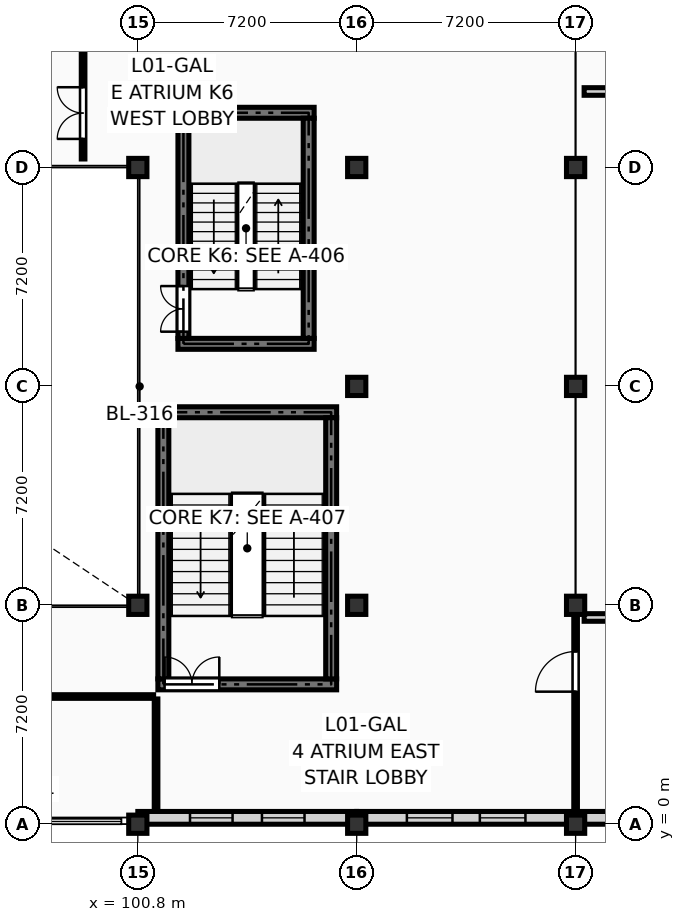
"""IFC4 building model, lengths in metres.
Left out: names, types, materials, properties, quantities, classifications, styles, units other than length and angle.
Written with IfcOpenShell. Run it as: python <this file> out.ifc"""

import sys

from ifc_helpers import new_model, si_unit, direction, frame, frame_2d, origin, origin_2d, place, context, subcontext, project, spatial, rectangle, extrude, element, fill, save


model = new_model("IFC4")
c1 = context("Model", 3, precision=1e-05, world=origin(), true_north=direction((0.0, 1.0)))
c2 = subcontext(c1, "Body", "Model", "MODEL_VIEW")
j1 = project(units=[si_unit("LENGTHUNIT", "METRE"), si_unit("PLANEANGLEUNIT", "RADIAN")], contexts=[c1])
p1 = place(None, origin())
s1 = spatial("IfcSite", under=j1, at=p1, CompositionType="ELEMENT")
p2 = place(p1, origin())
s2 = spatial("IfcBuilding", under=s1, at=p2, CompositionType="ELEMENT")
p3 = place(p2, frame((0.0, 0.0, 4.5)))
s3 = spatial("IfcBuildingStorey", under=s2, at=p3, CompositionType="ELEMENT", Elevation=4.5)
for number, where, z_axis, x_axis in (
    (1, (100.8, 0.0, 0.0), (0.0, 0.0, 1.0), (1.0, 0.0, 0.0)),
    (2, (100.8, 7.2, 0.0), (0.0, 0.0, 1.0), (1.0, 0.0, 0.0)),
    (3, (100.8, 21.6, 0.0), (0.0, 0.0, 1.0), (1.0, 0.0, 0.0)),
    (4, (108.0, 0.0, 0.0), (0.0, 0.0, 1.0), (1.0, 0.0, 0.0)),
    (5, (108.0, 7.2, 0.0), (0.0, 0.0, 1.0), (1.0, 0.0, 0.0)),
    (6, (108.0, 14.4, 0.0), (0.0, 0.0, 1.0), (1.0, 0.0, 0.0)),
    (7, (108.0, 21.6, 0.0), (0.0, 0.0, 1.0), (1.0, 0.0, 0.0)),
    (8, (115.2, 0.0, 0.0), (0.0, 0.0, 1.0), (1.0, 0.0, 0.0)),
    (9, (115.2, 7.2, 0.0), (0.0, 0.0, 1.0), (1.0, 0.0, 0.0)),
    (10, (115.2, 14.4, 0.0), (0.0, 0.0, 1.0), (1.0, 0.0, 0.0)),
    (11, (115.2, 21.6, 0.0), (0.0, 0.0, 1.0), (1.0, 0.0, 0.0)),
):
    element("IfcColumn", number, at=place(p3, frame(where, z_axis=z_axis, x_axis=x_axis)), inside=s3, PredefinedType="COLUMN", context=c2, shape_type="SweptSolid", body=[
        extrude(rectangle(XDim=0.6, YDim=0.6, at=origin_2d()), origin(), (0.0, 0.0, 1.0), 4.05),
    ])
p4 = place(p3, frame((115.2, 0.21, 0.0), z_axis=(0.0, 0.0, 1.0), x_axis=(1.0, 0.0, 0.0)))
e12 = element("IfcWall", 12, at=p4, inside=s3, PredefinedType="SOLIDWALL", context=c2, shape_type="SweptSolid", body=[
    extrude(rectangle(XDim=7.2, YDim=0.42, at=frame_2d((3.6, 0.0))), origin(), (0.0, 0.0, 1.0), 3.16),
])
p5 = place(p4, frame((1.75, 0.0, 0.45)))
e13 = element("IfcOpeningElement", 13, at=p5, cuts=e12, PredefinedType="OPENING", context=c2, shape_type="SweptSolid", body=[
    extrude(rectangle(XDim=1.35, YDim=2.45, at=frame_2d((0.675, 1.225))), frame((0.0, 0.222, 0.0), z_axis=(0.0, -1.0, 0.0), x_axis=(1.0, 0.0, 0.0)), (0.0, 0.0, 1.0), 0.444),
])
p6 = place(p4, frame((4.1, 0.0, 0.45)))
e14 = element("IfcOpeningElement", 14, at=p6, cuts=e12, PredefinedType="OPENING", context=c2, shape_type="SweptSolid", body=[
    extrude(rectangle(XDim=1.35, YDim=2.45, at=frame_2d((0.675, 1.225))), frame((0.0, 0.222, 0.0), z_axis=(0.0, -1.0, 0.0), x_axis=(1.0, 0.0, 0.0)), (0.0, 0.0, 1.0), 0.444),
])
p7 = place(p3, frame((108.0, 0.21, 0.0), z_axis=(0.0, 0.0, 1.0), x_axis=(1.0, 0.0, 0.0)))
e15 = element("IfcWall", 15, at=p7, inside=s3, PredefinedType="SOLIDWALL", context=c2, shape_type="SweptSolid", body=[
    extrude(rectangle(XDim=7.2, YDim=0.42, at=frame_2d((3.6, 0.0))), origin(), (0.0, 0.0, 1.0), 3.16),
])
p8 = place(p7, frame((1.65, 0.0, 0.45)))
e16 = element("IfcOpeningElement", 16, at=p8, cuts=e15, PredefinedType="OPENING", context=c2, shape_type="SweptSolid", body=[
    extrude(rectangle(XDim=1.5, YDim=2.4, at=frame_2d((0.75, 1.2))), frame((0.0, 0.222, 0.0), z_axis=(0.0, -1.0, 0.0), x_axis=(1.0, 0.0, 0.0)), (0.0, 0.0, 1.0), 0.444),
])
p9 = place(p7, frame((4.05, 0.0, 0.45)))
e17 = element("IfcOpeningElement", 17, at=p9, cuts=e15, PredefinedType="OPENING", context=c2, shape_type="SweptSolid", body=[
    extrude(rectangle(XDim=1.5, YDim=2.4, at=frame_2d((0.75, 1.2))), frame((0.0, 0.222, 0.0), z_axis=(0.0, -1.0, 0.0), x_axis=(1.0, 0.0, 0.0)), (0.0, 0.0, 1.0), 0.444),
])
p10 = place(p3, frame((100.8, 0.21, 0.0), z_axis=(0.0, 0.0, 1.0), x_axis=(1.0, 0.0, 0.0)))
e18 = element("IfcWall", 18, at=p10, inside=s3, PredefinedType="SOLIDWALL", context=c2, shape_type="SweptSolid", body=[
    extrude(rectangle(XDim=7.2, YDim=0.42, at=frame_2d((3.6, 0.0))), origin(), (0.0, 0.0, 1.0), 3.16),
])
p11 = place(p10, frame((1.717, 0.0, 0.45)))
e19 = element("IfcOpeningElement", 19, at=p11, cuts=e18, PredefinedType="OPENING", context=c2, shape_type="SweptSolid", body=[
    extrude(rectangle(XDim=1.4, YDim=2.38, at=frame_2d((0.7, 1.19))), frame((0.0, 0.222, 0.0), z_axis=(0.0, -1.0, 0.0), x_axis=(1.0, 0.0, 0.0)), (0.0, 0.0, 1.0), 0.444),
])
p12 = place(p10, frame((4.083, 0.0, 0.45)))
e20 = element("IfcOpeningElement", 20, at=p12, cuts=e18, PredefinedType="OPENING", context=c2, shape_type="SweptSolid", body=[
    extrude(rectangle(XDim=1.4, YDim=2.38, at=frame_2d((0.7, 1.19))), frame((0.0, 0.222, 0.0), z_axis=(0.0, -1.0, 0.0), x_axis=(1.0, 0.0, 0.0)), (0.0, 0.0, 1.0), 0.444),
])
for number, where, z_axis, x_axis in (
    (21, (102.12, 15.8, 0.0), (0.0, 0.0, 1.0), (1.0, 0.0, 0.0)),
    (22, (102.12, 23.4, 0.0), (0.0, 0.0, 1.0), (1.0, 0.0, 0.0)),
):
    element("IfcWall", number, at=place(p3, frame(where, z_axis=z_axis, x_axis=x_axis)), inside=s3, PredefinedType="SHEAR", context=c2, shape_type="SweptSolid", body=[
        extrude(rectangle(XDim=4.48, YDim=0.36, at=frame_2d((2.24, 0.0))), origin(), (0.0, 0.0, 1.0), 3.79),
    ])
p13 = place(p3, frame((102.3, 15.98, 0.0), z_axis=(0.0, 0.0, 1.0), x_axis=(0.0, 1.0, 0.0)))
e23 = element("IfcWall", 23, at=p13, inside=s3, PredefinedType="SHEAR", context=c2, shape_type="SweptSolid", body=[
    extrude(rectangle(XDim=7.24, YDim=0.36, at=frame_2d((3.62, 0.0))), origin(), (0.0, 0.0, 1.0), 3.79),
])
p14 = place(p13, frame((0.22, 0.0, 0.0)))
e24 = element("IfcOpeningElement", 24, at=p14, cuts=e23, PredefinedType="OPENING", context=c2, shape_type="SweptSolid", body=[
    extrude(rectangle(XDim=1.5, YDim=2.2, at=frame_2d((0.75, 1.1))), frame((0.0, 0.192, 0.0), z_axis=(0.0, -1.0, 0.0), x_axis=(1.0, 0.0, 0.0)), (0.0, 0.0, 1.0), 0.384),
])
p15 = place(p3, frame((106.42, 15.98, 0.0), z_axis=(0.0, 0.0, 1.0), x_axis=(0.0, 1.0, 0.0)))
e25 = element("IfcWall", 25, at=p15, inside=s3, PredefinedType="SHEAR", context=c2, shape_type="SweptSolid", body=[
    extrude(rectangle(XDim=7.24, YDim=0.36, at=frame_2d((3.62, 0.0))), origin(), (0.0, 0.0, 1.0), 3.79),
])
p16 = place(p3, frame((101.46, 4.6, 0.0), z_axis=(0.0, 0.0, 1.0), x_axis=(1.0, 0.0, 0.0)))
e26 = element("IfcWall", 26, at=p16, inside=s3, PredefinedType="SHEAR", context=c2, shape_type="SweptSolid", body=[
    extrude(rectangle(XDim=5.88, YDim=0.36, at=frame_2d((2.94, 0.0))), origin(), (0.0, 0.0, 1.0), 3.79),
])
p17 = place(p16, frame((0.22, 0.0, 0.0)))
e27 = element("IfcOpeningElement", 27, at=p17, cuts=e26, PredefinedType="OPENING", context=c2, shape_type="SweptSolid", body=[
    extrude(rectangle(XDim=1.8, YDim=2.2, at=frame_2d((0.9, 1.1))), frame((0.0, 0.192, 0.0), z_axis=(0.0, -1.0, 0.0), x_axis=(1.0, 0.0, 0.0)), (0.0, 0.0, 1.0), 0.384),
])
p18 = place(p3, frame((101.46, 13.55, 0.0), z_axis=(0.0, 0.0, 1.0), x_axis=(1.0, 0.0, 0.0)))
e28 = element("IfcWall", 28, at=p18, inside=s3, PredefinedType="SHEAR", context=c2, shape_type="SweptSolid", body=[
    extrude(rectangle(XDim=5.88, YDim=0.36, at=frame_2d((2.94, 0.0))), origin(), (0.0, 0.0, 1.0), 3.79),
])
for number, where, z_axis, x_axis in (
    (29, (101.64, 4.78, 0.0), (0.0, 0.0, 1.0), (0.0, 1.0, 0.0)),
    (30, (107.16, 4.78, 0.0), (0.0, 0.0, 1.0), (0.0, 1.0, 0.0)),
):
    element("IfcWall", number, at=place(p3, frame(where, z_axis=z_axis, x_axis=x_axis)), inside=s3, PredefinedType="SHEAR", context=c2, shape_type="SweptSolid", body=[
        extrude(rectangle(XDim=8.59, YDim=0.36, at=frame_2d((4.295, 0.0))), origin(), (0.0, 0.0, 1.0), 3.79),
    ])
p19 = place(p2, origin())
s4 = spatial("IfcBuildingStorey", under=s2, at=p19, CompositionType="ELEMENT", Elevation=0.0)
p20 = place(p19, frame((115.48, 6.8, 0.0), z_axis=(0.0, 0.0, 1.0), x_axis=(1.0, 0.0, 0.0)))
e31 = element("IfcWall", 31, at=p20, inside=s4, PredefinedType="PARTITIONING", context=c2, shape_type="SweptSolid", body=[
    extrude(rectangle(XDim=19.24, YDim=0.25, at=frame_2d((9.62, 0.0))), origin(), (0.0, 0.0, 1.0), 7.525),
])
p21 = place(p19, frame((115.48, 24.1, 0.0), z_axis=(0.0, 0.0, 1.0), x_axis=(1.0, 0.0, 0.0)))
e32 = element("IfcWall", 32, at=p21, inside=s4, PredefinedType="PARTITIONING", context=c2, shape_type="SweptSolid", body=[
    extrude(rectangle(XDim=19.24, YDim=0.25, at=frame_2d((9.62, 0.0))), origin(), (0.0, 0.0, 1.0), 8.185),
])
p22 = place(p21, frame((8.72, 0.0, 0.0)))
e33 = element("IfcOpeningElement", 33, at=p22, cuts=e32, PredefinedType="OPENING", context=c2, shape_type="SweptSolid", body=[
    extrude(rectangle(XDim=1.8, YDim=2.3, at=frame_2d((0.9, 1.15))), frame((0.0, 0.137, 0.0), z_axis=(0.0, -1.0, 0.0), x_axis=(1.0, 0.0, 0.0)), (0.0, 0.0, 1.0), 0.274),
])
p23 = place(p3, frame((101.4, 0.48, 0.0), z_axis=(0.0, 0.0, 1.0), x_axis=(0.0, 1.0, 0.0)))
e34 = element("IfcWall", 34, at=p23, inside=s3, PredefinedType="PARTITIONING", context=c2, shape_type="SweptSolid", body=[
    extrude(rectangle(XDim=3.64, YDim=0.12, at=frame_2d((1.82, 0.0))), origin(), (0.0, 0.0, 1.0), 3.775),
])
p24 = place(p3, frame((64.88, 4.2, 0.0), z_axis=(0.0, 0.0, 1.0), x_axis=(1.0, 0.0, 0.0)))
e35 = element("IfcWall", 35, at=p24, inside=s3, PredefinedType="PARTITIONING", context=c2, shape_type="SweptSolid", body=[
    extrude(rectangle(XDim=36.44, YDim=0.12, at=frame_2d((18.22, 0.0))), origin(), (0.0, 0.0, 1.0), 3.775),
])
p25 = place(p24, frame((17.56, 0.0, 0.0)))
e36 = element("IfcOpeningElement", 36, at=p25, cuts=e35, PredefinedType="OPENING", context=c2, shape_type="SweptSolid", body=[
    extrude(rectangle(XDim=1.32, YDim=2.2, at=frame_2d((0.66, 1.1))), frame((0.0, 0.072, 0.0), z_axis=(0.0, -1.0, 0.0), x_axis=(1.0, 0.0, 0.0)), (0.0, 0.0, 1.0), 0.144),
])
p26 = place(p3, frame((99.0, 21.88, 0.0), z_axis=(0.0, 0.0, 1.0), x_axis=(0.0, 1.0, 0.0)))
e37 = element("IfcWall", 37, at=p26, inside=s3, PredefinedType="PARTITIONING", context=c2, shape_type="SweptSolid", body=[
    extrude(rectangle(XDim=6.44, YDim=0.12, at=frame_2d((3.22, 0.0))), origin(), (0.0, 0.0, 1.0), 3.775),
])
p27 = place(p26, frame((0.66, 0.0, 0.0)))
e38 = element("IfcOpeningElement", 38, at=p27, cuts=e37, PredefinedType="OPENING", context=c2, shape_type="SweptSolid", body=[
    extrude(rectangle(XDim=1.7, YDim=2.28, at=frame_2d((0.85, 1.14))), frame((0.0, 0.072, 0.0), z_axis=(0.0, -1.0, 0.0), x_axis=(1.0, 0.0, 0.0)), (0.0, 0.0, 1.0), 0.144),
])
p28 = place(p3, frame((115.2, 0.48, 0.0), z_axis=(0.0, 0.0, 1.0), x_axis=(0.0, 1.0, 0.0)))
e39 = element("IfcWall", 39, at=p28, inside=s3, PredefinedType="PARTITIONING", context=c2, shape_type="SweptSolid", body=[
    extrude(rectangle(XDim=6.44, YDim=0.12, at=frame_2d((3.22, 0.0))), origin(), (0.0, 0.0, 1.0), 2.925),
])
p29 = place(p28, frame((3.88, 0.0, 0.0)))
e40 = element("IfcOpeningElement", 40, at=p29, cuts=e39, PredefinedType="OPENING", context=c2, shape_type="SweptSolid", body=[
    extrude(rectangle(XDim=1.32, YDim=2.2, at=frame_2d((0.66, 1.1))), frame((0.0, 0.072, 0.0), z_axis=(0.0, -1.0, 0.0), x_axis=(1.0, 0.0, 0.0)), (0.0, 0.0, 1.0), 0.144),
])
p30 = place(p8, origin())
e41 = element("IfcWindow", 41, at=p30, inside=s3, PartitioningType="SINGLE_PANEL", PredefinedType="WINDOW", context=c2, shape_type="SweptSolid", body=[
    extrude(rectangle(XDim=1.5, YDim=2.4, at=frame_2d((0.75, 1.2))), frame((0.0, 0.03, 0.0), z_axis=(0.0, -1.0, 0.0), x_axis=(1.0, 0.0, 0.0)), (0.0, 0.0, 1.0), 0.06),
])
fill(e16, e41)
p31 = place(p9, origin())
e42 = element("IfcWindow", 42, at=p31, inside=s3, PartitioningType="SINGLE_PANEL", PredefinedType="WINDOW", context=c2, shape_type="SweptSolid", body=[
    extrude(rectangle(XDim=1.5, YDim=2.4, at=frame_2d((0.75, 1.2))), frame((0.0, 0.03, 0.0), z_axis=(0.0, -1.0, 0.0), x_axis=(1.0, 0.0, 0.0)), (0.0, 0.0, 1.0), 0.06),
])
fill(e17, e42)
p32 = place(p11, origin())
e43 = element("IfcWindow", 43, at=p32, inside=s3, PartitioningType="SINGLE_PANEL", PredefinedType="WINDOW", context=c2, shape_type="SweptSolid", body=[
    extrude(rectangle(XDim=1.4, YDim=2.38, at=frame_2d((0.7, 1.19))), frame((0.0, 0.03, 0.0), z_axis=(0.0, -1.0, 0.0), x_axis=(1.0, 0.0, 0.0)), (0.0, 0.0, 1.0), 0.06),
])
fill(e19, e43)
p33 = place(p12, origin())
e44 = element("IfcWindow", 44, at=p33, inside=s3, PartitioningType="SINGLE_PANEL", PredefinedType="WINDOW", context=c2, shape_type="SweptSolid", body=[
    extrude(rectangle(XDim=1.4, YDim=2.38, at=frame_2d((0.7, 1.19))), frame((0.0, 0.03, 0.0), z_axis=(0.0, -1.0, 0.0), x_axis=(1.0, 0.0, 0.0)), (0.0, 0.0, 1.0), 0.06),
])
fill(e20, e44)
p34 = place(p14, origin())
e45 = element("IfcDoor", 45, at=p34, inside=s3, OperationType="DOUBLE_DOOR_SINGLE_SWING", PredefinedType="DOOR", context=c2, shape_type="SweptSolid", body=[
    extrude(rectangle(XDim=1.5, YDim=2.2, at=frame_2d((0.75, 1.1))), frame((0.0, 0.025, 0.0), z_axis=(0.0, -1.0, 0.0), x_axis=(1.0, 0.0, 0.0)), (0.0, 0.0, 1.0), 0.05),
])
fill(e24, e45)
p35 = place(p17, origin())
e46 = element("IfcDoor", 46, at=p35, inside=s3, OperationType="DOUBLE_DOOR_SINGLE_SWING", PredefinedType="DOOR", context=c2, shape_type="SweptSolid", body=[
    extrude(rectangle(XDim=1.8, YDim=2.2, at=frame_2d((0.9, 1.1))), frame((0.0, 0.025, 0.0), z_axis=(0.0, -1.0, 0.0), x_axis=(1.0, 0.0, 0.0)), (0.0, 0.0, 1.0), 0.05),
])
fill(e27, e46)
p36 = place(p27, origin())
e47 = element("IfcDoor", 47, at=p36, inside=s3, OperationType="DOUBLE_DOOR_SINGLE_SWING", PredefinedType="DOOR", context=c2, shape_type="SweptSolid", body=[
    extrude(rectangle(XDim=1.7, YDim=2.28, at=frame_2d((0.85, 1.14))), frame((0.0, 0.025, 0.0), z_axis=(0.0, -1.0, 0.0), x_axis=(1.0, 0.0, 0.0)), (0.0, 0.0, 1.0), 0.05),
])
fill(e38, e47)
p37 = place(p29, origin())
e48 = element("IfcDoor", 48, at=p37, inside=s3, OperationType="SINGLE_SWING_LEFT", PredefinedType="DOOR", context=c2, shape_type="SweptSolid", body=[
    extrude(rectangle(XDim=1.32, YDim=2.2, at=frame_2d((0.66, 1.1))), frame((0.0, 0.025, 0.0), z_axis=(0.0, -1.0, 0.0), x_axis=(1.0, 0.0, 0.0)), (0.0, 0.0, 1.0), 0.05),
])
fill(e40, e48)
save(model, sys.argv[1])
